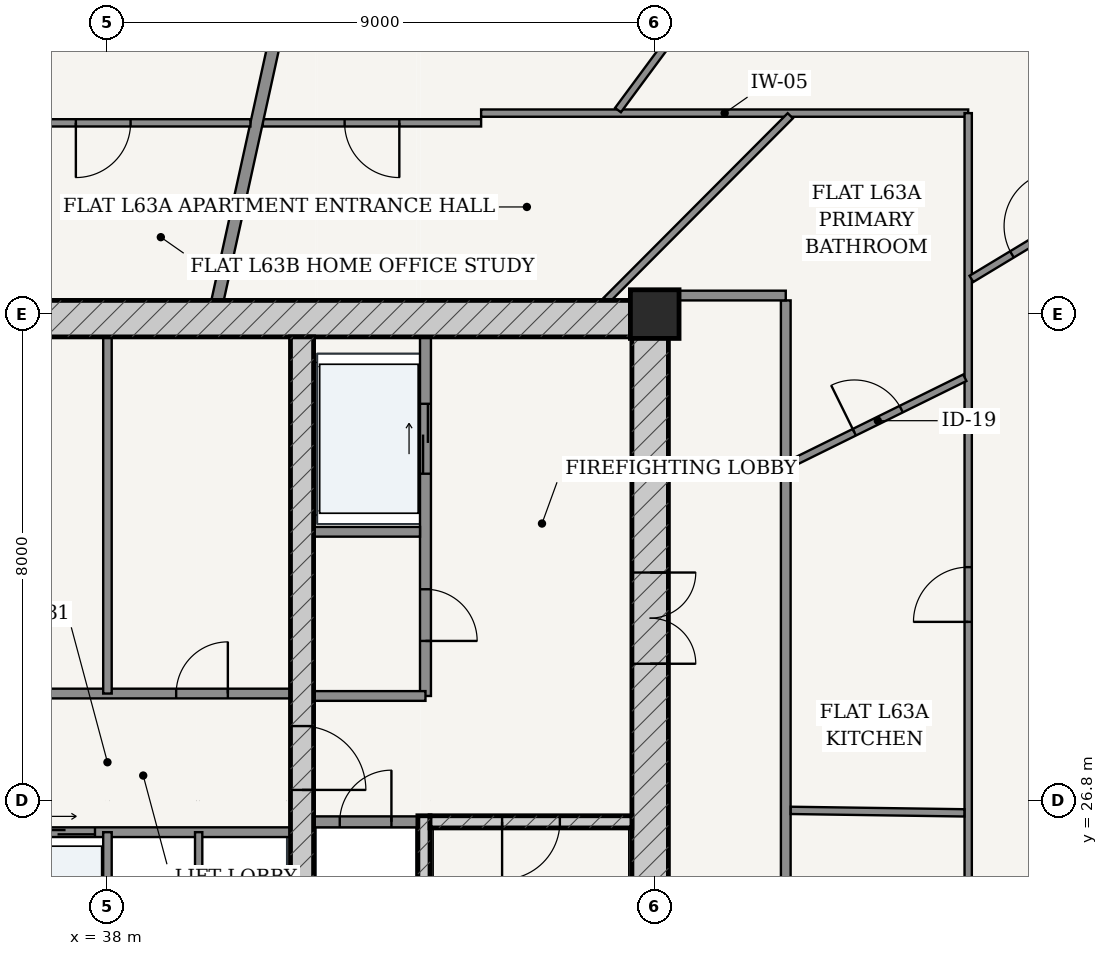
"""IFC4 building model, lengths in metres.
Left out: names, types, materials, properties, quantities, classifications, styles, units other than length and angle.
Written with IfcOpenShell. Run it as: python <this file> out.ifc"""

import sys

from ifc_helpers import new_model, si_unit, direction, frame, frame_2d, origin, origin_2d, place, context, subcontext, project, spatial, rectangle, extrude, source, transform, mapped, element, fill, save


model = new_model("IFC4")
c1 = context("Model", 3, precision=1e-05, world=origin(), true_north=direction((-0.2419218956, 0.970295726276)))
c2 = subcontext(c1, "Body", "Model", "MODEL_VIEW")
j1 = project(units=[si_unit("LENGTHUNIT", "METRE"), si_unit("PLANEANGLEUNIT", "RADIAN")], contexts=[c1])
p1 = place(None, origin())
s1 = spatial("IfcSite", under=j1, at=p1, CompositionType="ELEMENT")
p2 = place(p1, origin())
s2 = spatial("IfcBuilding", under=s1, at=p2, CompositionType="ELEMENT")
p3 = place(p2, frame((0.0, 0.0, 239.3)))
s3 = spatial("IfcBuildingStorey", under=s2, at=p3, CompositionType="ELEMENT", Elevation=239.3)
p4 = place(p3, frame((47.0, 34.8, 0.0), z_axis=(0.0, 0.0, 1.0), x_axis=(1.0, 0.0, 0.0)))
e1 = element("IfcColumn", 1, at=p4, inside=s3, PredefinedType="COLUMN", context=c2, shape_type="SweptSolid", body=[
    extrude(rectangle(XDim=0.8, YDim=0.8, at=origin_2d()), origin(), (0.0, 0.0, 1.0), 3.7),
])
p5 = place(p3, frame((28.775, 34.725, 0.0), z_axis=(0.0, 0.0, 1.0), x_axis=(1.0, 0.0, 0.0)))
e2 = element("IfcWall", 2, at=p5, inside=s3, PredefinedType="SHEAR", context=c2, shape_type="SweptSolid", body=[
    extrude(rectangle(XDim=18.45, YDim=0.6, at=frame_2d((9.225, 0.0))), origin(), (0.0, 0.0, 1.0), 3.25),
])
p6 = place(p3, frame((46.925, 19.175, 0.0), z_axis=(0.0, 0.0, 1.0), x_axis=(0.0, 1.0, 0.0)))
e3 = element("IfcWall", 3, at=p6, inside=s3, PredefinedType="SHEAR", context=c2, shape_type="SweptSolid", body=[
    extrude(rectangle(XDim=15.25, YDim=0.6, at=frame_2d((7.625, 0.0))), origin(), (0.0, 0.0, 1.0), 3.25),
])
p7 = place(p6, frame((9.875, 0.0, 0.0)))
e4 = element("IfcOpeningElement", 4, at=p7, cuts=e3, PredefinedType="OPENING", context=c2, shape_type="SweptSolid", body=[
    extrude(rectangle(XDim=1.5, YDim=2.2, at=frame_2d((0.75, 1.1))), frame((0.0, 0.31, 0.0), z_axis=(0.0, -1.0, 0.0), x_axis=(1.0, 0.0, 0.0)), (0.0, 0.0, 1.0), 0.62),
])
p8 = place(p3, frame((43.205, 19.175, 0.0), z_axis=(0.0, 0.0, 1.0), x_axis=(0.0, 1.0, 0.0)))
e5 = element("IfcWall", 5, at=p8, inside=s3, PredefinedType="SOLIDWALL", context=c2, shape_type="SweptSolid", body=[
    extrude(rectangle(XDim=7.375, YDim=0.2, at=frame_2d((3.688, 0.0))), origin(), (0.0, 0.0, 1.0), 3.25),
])
p9 = place(p3, frame((43.305, 26.45, 0.0), z_axis=(0.0, 0.0, 1.0), x_axis=(1.0, 0.0, 0.0)))
e6 = element("IfcWall", 6, at=p9, inside=s3, PredefinedType="SOLIDWALL", context=c2, shape_type="SweptSolid", body=[
    extrude(rectangle(XDim=3.32, YDim=0.2, at=frame_2d((1.66, 0.0))), origin(), (0.0, 0.0, 1.0), 3.25),
])
p10 = place(p9, frame((1.185, 0.0, 0.0)))
e7 = element("IfcOpeningElement", 7, at=p10, cuts=e6, PredefinedType="OPENING", context=c2, shape_type="SweptSolid", body=[
    extrude(rectangle(XDim=0.95, YDim=2.15, at=frame_2d((0.475, 1.075))), frame((0.0, 0.11, 0.0), z_axis=(0.0, -1.0, 0.0), x_axis=(1.0, 0.0, 0.0)), (0.0, 0.0, 1.0), 0.22),
])
p11 = place(p3, frame((41.2, 19.175, 0.0), z_axis=(0.0, 0.0, 1.0), x_axis=(0.0, 1.0, 0.0)))
e8 = element("IfcWall", 8, at=p11, inside=s3, PredefinedType="SHEAR", context=c2, shape_type="SweptSolid", body=[
    extrude(rectangle(XDim=15.25, YDim=0.38, at=frame_2d((7.625, 0.0))), origin(), (0.0, 0.0, 1.0), 3.25),
])
p12 = place(p11, frame((7.8, 0.0, 0.0)))
e9 = element("IfcOpeningElement", 9, at=p12, cuts=e8, PredefinedType="OPENING", context=c2, shape_type="SweptSolid", body=[
    extrude(rectangle(XDim=1.05, YDim=2.15, at=frame_2d((0.525, 1.075))), frame((0.0, 0.2, 0.0), z_axis=(0.0, -1.0, 0.0), x_axis=(1.0, 0.0, 0.0)), (0.0, 0.0, 1.0), 0.4),
])
p13 = place(p3, frame((41.39, 26.45, 0.0), z_axis=(0.0, 0.0, 1.0), x_axis=(1.0, 0.0, 0.0)))
e10 = element("IfcWall", 10, at=p13, inside=s3, PredefinedType="PARTITIONING", context=c2, shape_type="SweptSolid", body=[
    extrude(rectangle(XDim=1.71, YDim=0.18, at=frame_2d((0.855, 0.0))), origin(), (0.0, 0.0, 1.0), 3.25),
])
p14 = place(p13, frame((0.43, 0.0, 0.0)))
e11 = element("IfcOpeningElement", 11, at=p14, cuts=e10, PredefinedType="OPENING", context=c2, shape_type="SweptSolid", body=[
    extrude(rectangle(XDim=0.85, YDim=2.1, at=frame_2d((0.425, 1.05))), frame((0.0, 0.1, 0.0), z_axis=(0.0, -1.0, 0.0), x_axis=(1.0, 0.0, 0.0)), (0.0, 0.0, 1.0), 0.2),
])
p15 = place(p3, frame((43.23, 28.52, 0.0), z_axis=(0.0, 0.0, 1.0), x_axis=(0.0, 1.0, 0.0)))
e12 = element("IfcWall", 12, at=p15, inside=s3, PredefinedType="PARTITIONING", context=c2, shape_type="SweptSolid", body=[
    extrude(rectangle(XDim=5.905, YDim=0.18, at=frame_2d((2.953, 0.0))), origin(), (0.0, 0.0, 1.0), 3.25),
])
p16 = place(p15, frame((0.905, 0.0, 0.0)))
e13 = element("IfcOpeningElement", 13, at=p16, cuts=e12, PredefinedType="OPENING", context=c2, shape_type="SweptSolid", body=[
    extrude(rectangle(XDim=0.85, YDim=2.1, at=frame_2d((0.425, 1.05))), frame((0.0, 0.1, 0.0), z_axis=(0.0, -1.0, 0.0), x_axis=(1.0, 0.0, 0.0)), (0.0, 0.0, 1.0), 0.2),
])
p17 = place(p15, frame((3.655, 0.0, 0.0)))
e14 = element("IfcOpeningElement", 14, at=p17, cuts=e12, PredefinedType="OPENING", context=c2, shape_type="SweptSolid", body=[
    extrude(rectangle(XDim=1.15, YDim=2.2, at=frame_2d((0.575, 1.1))), frame((0.0, 0.1, 0.0), z_axis=(0.0, -1.0, 0.0), x_axis=(1.0, 0.0, 0.0)), (0.0, 0.0, 1.0), 0.2),
])
p18 = place(p3, frame((41.39, 31.22, 0.0), z_axis=(0.0, 0.0, 1.0), x_axis=(1.0, 0.0, 0.0)))
e15 = element("IfcWall", 15, at=p18, inside=s3, PredefinedType="PARTITIONING", context=c2, shape_type="SweptSolid", body=[
    extrude(rectangle(XDim=1.75, YDim=0.16, at=frame_2d((0.875, 0.0))), origin(), (0.0, 0.0, 1.0), 3.25),
])
p19 = place(p3, frame((41.39, 28.52, 0.0), z_axis=(0.0, 0.0, 1.0), x_axis=(1.0, 0.0, 0.0)))
e16 = element("IfcWall", 16, at=p19, inside=s3, PredefinedType="PARTITIONING", context=c2, shape_type="SweptSolid", body=[
    extrude(rectangle(XDim=1.84, YDim=0.16, at=frame_2d((0.92, 0.0))), origin(), (0.0, 0.0, 1.0), 3.25),
])
p20 = place(p3, frame((34.99, 28.56, 0.0), z_axis=(0.0, 0.0, 1.0), x_axis=(1.0, 0.0, 0.0)))
e17 = element("IfcWall", 17, at=p20, inside=s3, PredefinedType="PARTITIONING", context=c2, shape_type="SweptSolid", body=[
    extrude(rectangle(XDim=6.02, YDim=0.16, at=frame_2d((3.01, 0.0))), origin(), (0.0, 0.0, 1.0), 3.25),
])
p21 = place(p20, frame((1.025, 0.0, 0.0)))
e18 = element("IfcOpeningElement", 18, at=p21, cuts=e17, PredefinedType="OPENING", context=c2, shape_type="SweptSolid", body=[
    extrude(rectangle(XDim=0.86, YDim=2.1, at=frame_2d((0.43, 1.05))), frame((0.0, 0.09, 0.0), z_axis=(0.0, -1.0, 0.0), x_axis=(1.0, 0.0, 0.0)), (0.0, 0.0, 1.0), 0.18),
])
p22 = place(p20, frame((4.14, 0.0, 0.0)))
e19 = element("IfcOpeningElement", 19, at=p22, cuts=e17, PredefinedType="OPENING", context=c2, shape_type="SweptSolid", body=[
    extrude(rectangle(XDim=0.85, YDim=2.1, at=frame_2d((0.425, 1.05))), frame((0.0, 0.09, 0.0), z_axis=(0.0, -1.0, 0.0), x_axis=(1.0, 0.0, 0.0)), (0.0, 0.0, 1.0), 0.18),
])
p23 = place(p3, frame((38.0, 28.56, 0.0), z_axis=(0.0, 0.0, 1.0), x_axis=(0.0, 1.0, 0.0)))
e20 = element("IfcWall", 20, at=p23, inside=s3, PredefinedType="PARTITIONING", context=c2, shape_type="SweptSolid", body=[
    extrude(rectangle(XDim=5.865, YDim=0.14, at=frame_2d((2.933, 0.0))), origin(), (0.0, 0.0, 1.0), 3.25),
])
p24 = place(p3, frame((34.99, 26.28, 0.0), z_axis=(0.0, 0.0, 1.0), x_axis=(1.0, 0.0, 0.0)))
e21 = element("IfcWall", 21, at=p24, inside=s3, PredefinedType="PARTITIONING", context=c2, shape_type="SweptSolid", body=[
    extrude(rectangle(XDim=6.02, YDim=0.16, at=frame_2d((3.01, 0.0))), origin(), (0.0, 0.0, 1.0), 3.25),
])
p25 = place(p24, frame((0.225, 0.0, 0.0)))
e22 = element("IfcOpeningElement", 22, at=p25, cuts=e21, PredefinedType="OPENING", context=c2, shape_type="SweptSolid", body=[
    extrude(rectangle(XDim=1.1, YDim=2.2, at=frame_2d((0.55, 1.1))), frame((0.0, 0.09, 0.0), z_axis=(0.0, -1.0, 0.0), x_axis=(1.0, 0.0, 0.0)), (0.0, 0.0, 1.0), 0.18),
])
p26 = place(p24, frame((1.705, 0.0, 0.0)))
e23 = element("IfcOpeningElement", 23, at=p26, cuts=e21, PredefinedType="OPENING", context=c2, shape_type="SweptSolid", body=[
    extrude(rectangle(XDim=1.1, YDim=2.2, at=frame_2d((0.55, 1.1))), frame((0.0, 0.09, 0.0), z_axis=(0.0, -1.0, 0.0), x_axis=(1.0, 0.0, 0.0)), (0.0, 0.0, 1.0), 0.18),
])
p27 = place(p3, frame((38.0, 23.72, 0.0), z_axis=(0.0, 0.0, 1.0), x_axis=(0.0, 1.0, 0.0)))
e24 = element("IfcWall", 24, at=p27, inside=s3, PredefinedType="PARTITIONING", context=c2, shape_type="SweptSolid", body=[
    extrude(rectangle(XDim=2.56, YDim=0.14, at=frame_2d((1.28, 0.0))), origin(), (0.0, 0.0, 1.0), 3.25),
])
p28 = place(p3, frame((39.5, 23.72, 0.0), z_axis=(0.0, 0.0, 1.0), x_axis=(0.0, 1.0, 0.0)))
e25 = element("IfcWall", 25, at=p28, inside=s3, PredefinedType="PARTITIONING", context=c2, shape_type="SweptSolid", body=[
    extrude(rectangle(XDim=2.56, YDim=0.12, at=frame_2d((1.28, 0.0))), origin(), (0.0, 0.0, 1.0), 3.25),
])
p29 = place(p3, frame((49.155, 16.725, 0.0), z_axis=(0.0, 0.0, 1.0), x_axis=(0.0, 1.0, 0.0)))
e26 = element("IfcWall", 26, at=p29, inside=s3, PredefinedType="PARTITIONING", context=c2, shape_type="SweptSolid", body=[
    extrude(rectangle(XDim=18.3, YDim=0.16, at=frame_2d((9.15, 0.0))), origin(), (0.0, 0.0, 1.0), 2.775),
])
p30 = place(p29, frame((7.401, 0.0, 0.0)))
e27 = element("IfcOpeningElement", 27, at=p30, cuts=e26, PredefinedType="OPENING", context=c2, shape_type="SweptSolid", body=[
    extrude(rectangle(XDim=0.98, YDim=2.2, at=frame_2d((0.49, 1.1))), frame((0.0, 0.09, 0.0), z_axis=(0.0, -1.0, 0.0), x_axis=(1.0, 0.0, 0.0)), (0.0, 0.0, 1.0), 0.18),
])
p31 = place(p3, frame((47.225, 35.105, 0.0), z_axis=(0.0, 0.0, 1.0), x_axis=(1.0, 0.0, 0.0)))
e28 = element("IfcWall", 28, at=p31, inside=s3, PredefinedType="PARTITIONING", context=c2, shape_type="SweptSolid", body=[
    extrude(rectangle(XDim=1.93, YDim=0.16, at=frame_2d((0.965, 0.0))), origin(), (0.0, 0.0, 1.0), 3.25),
])
p32 = place(p3, frame((40.555, 37.945, 0.0), z_axis=(0.0, 0.0, 1.0), x_axis=(1.0, 0.0, 0.0)))
e29 = element("IfcWall", 29, at=p32, inside=s3, PredefinedType="PARTITIONING", context=c2, shape_type="SweptSolid", body=[
    extrude(rectangle(XDim=3.59, YDim=0.12, at=frame_2d((1.795, 0.0))), origin(), (0.0, 0.0, 1.0), 3.25),
])
p33 = place(p32, frame((1.345, 0.0, 0.0)))
e30 = element("IfcOpeningElement", 30, at=p33, cuts=e29, PredefinedType="OPENING", context=c2, shape_type="SweptSolid", body=[
    extrude(rectangle(XDim=0.9, YDim=2.15, at=frame_2d((0.45, 1.075))), frame((0.0, 0.07, 0.0), z_axis=(0.0, -1.0, 0.0), x_axis=(1.0, 0.0, 0.0)), (0.0, 0.0, 1.0), 0.14),
])
p34 = place(p3, frame((44.145, 38.105, 0.0), z_axis=(0.0, 0.0, 1.0), x_axis=(1.0, 0.0, 0.0)))
e31 = element("IfcWall", 31, at=p34, inside=s3, PredefinedType="PARTITIONING", context=c2, shape_type="SweptSolid", body=[
    extrude(rectangle(XDim=8.01, YDim=0.12, at=frame_2d((4.005, 0.0))), origin(), (0.0, 0.0, 1.0), 2.775),
])
p35 = place(p3, frame((52.155, 38.105, 0.0), z_axis=(0.0, 0.0, 1.0), x_axis=(0.0, -1.0, 0.0)))
e32 = element("IfcWall", 32, at=p35, inside=s3, PredefinedType="PARTITIONING", context=c2, shape_type="SweptSolid", body=[
    extrude(rectangle(XDim=16.501, YDim=0.12, at=frame_2d((8.251, 0.0))), origin(), (0.0, 0.0, 1.0), 2.775),
])
p36 = place(p35, frame((13.395, 0.0, 0.0)))
e33 = element("IfcOpeningElement", 33, at=p36, cuts=e32, PredefinedType="OPENING", context=c2, shape_type="SweptSolid", body=[
    extrude(rectangle(XDim=0.9, YDim=2.15, at=frame_2d((0.45, 1.075))), frame((0.0, 0.07, 0.0), z_axis=(0.0, -1.0, 0.0), x_axis=(1.0, 0.0, 0.0)), (0.0, 0.0, 1.0), 0.14),
])
p37 = place(p35, frame((7.467, 0.0, 0.0)))
e34 = element("IfcOpeningElement", 34, at=p37, cuts=e32, PredefinedType="OPENING", context=c2, shape_type="SweptSolid", body=[
    extrude(rectangle(XDim=0.9, YDim=2.15, at=frame_2d((0.45, 1.075))), frame((0.0, 0.07, 0.0), z_axis=(0.0, -1.0, 0.0), x_axis=(1.0, 0.0, 0.0)), (0.0, 0.0, 1.0), 0.14),
])
p38 = place(p3, frame((52.208, 35.379, 0.0), z_axis=(0.0, 0.0, 1.0), x_axis=(0.856039372964, 0.516910622774, 0.0)))
e35 = element("IfcWall", 35, at=p38, inside=s3, PredefinedType="PARTITIONING", context=c2, shape_type="SweptSolid", body=[
    extrude(rectangle(XDim=4.471, YDim=0.12, at=frame_2d((2.236, 0.0))), origin(), (0.0, 0.0, 1.0), 2.6),
])
p39 = place(p38, frame((0.779, 0.0, 0.0)))
e36 = element("IfcOpeningElement", 36, at=p39, cuts=e35, PredefinedType="OPENING", context=c2, shape_type="SweptSolid", body=[
    extrude(rectangle(XDim=0.9, YDim=2.15, at=frame_2d((0.45, 1.075))), frame((0.0, 0.07, 0.0), z_axis=(0.0, -1.0, 0.0), x_axis=(1.0, 0.0, 0.0)), (0.0, 0.0, 1.0), 0.14),
])
p40 = place(p3, frame((46.396, 38.155, 0.0), z_axis=(0.0, 0.0, 1.0), x_axis=(0.594526205526, 0.804076234535, 0.0)))
e37 = element("IfcWall", 37, at=p40, inside=s3, PredefinedType="PARTITIONING", context=c2, shape_type="SweptSolid", body=[
    extrude(rectangle(XDim=6.146, YDim=0.12, at=frame_2d((3.073, 0.0))), origin(), (0.0, 0.0, 1.0), 2.6),
])
p41 = place(p40, frame((1.615, 0.0, 0.0)))
e38 = element("IfcOpeningElement", 38, at=p41, cuts=e37, PredefinedType="OPENING", context=c2, shape_type="SweptSolid", body=[
    extrude(rectangle(XDim=0.9, YDim=2.15, at=frame_2d((0.45, 1.075))), frame((0.0, 0.07, 0.0), z_axis=(0.0, -1.0, 0.0), x_axis=(1.0, 0.0, 0.0)), (0.0, 0.0, 1.0), 0.14),
])
p42 = place(p3, frame((49.237, 26.639, 0.0), z_axis=(0.0, 0.0, 1.0), x_axis=(0.999896890624, -0.014359948506, 0.0)))
e39 = element("IfcWall", 39, at=p42, inside=s3, PredefinedType="PARTITIONING", context=c2, shape_type="SweptSolid", body=[
    extrude(rectangle(XDim=2.856, YDim=0.12, at=frame_2d((1.428, 0.0))), origin(), (0.0, 0.0, 1.0), 2.969),
])
p43 = place(p3, frame((49.237, 32.341, 0.0), z_axis=(0.0, 0.0, 1.0), x_axis=(0.896876689717, 0.442280684004, 0.0)))
e40 = element("IfcWall", 40, at=p43, inside=s3, PredefinedType="PARTITIONING", context=c2, shape_type="SweptSolid", body=[
    extrude(rectangle(XDim=3.192, YDim=0.12, at=frame_2d((1.596, 0.0))), origin(), (0.0, 0.0, 1.0), 2.969),
])
p44 = place(p43, frame((1.166, 0.0, 0.0)))
e41 = element("IfcOpeningElement", 41, at=p44, cuts=e40, PredefinedType="OPENING", context=c2, shape_type="SweptSolid", body=[
    extrude(rectangle(XDim=0.86, YDim=2.15, at=frame_2d((0.43, 1.075))), frame((0.0, 0.07, 0.0), z_axis=(0.0, -1.0, 0.0), x_axis=(1.0, 0.0, 0.0)), (0.0, 0.0, 1.0), 0.14),
])
p45 = place(p3, frame((46.203, 35.026, 0.0), z_axis=(0.0, 0.0, 1.0), x_axis=(0.706080585752, 0.708131489502, 0.0)))
e42 = element("IfcWall", 42, at=p45, inside=s3, PredefinedType="PARTITIONING", context=c2, shape_type="SweptSolid", body=[
    extrude(rectangle(XDim=4.285, YDim=0.12, at=frame_2d((2.143, 0.0))), origin(), (0.0, 0.0, 1.0), 2.775),
])
p46 = place(p3, frame((39.811, 35.027, 0.0), z_axis=(0.0, 0.0, 1.0), x_axis=(0.214966857327, 0.976621344356, 0.0)))
e43 = element("IfcWall", 43, at=p46, inside=s3, PredefinedType="PARTITIONING", context=c2, shape_type="SweptSolid", body=[
    extrude(rectangle(XDim=11.258, YDim=0.2, at=frame_2d((5.629, 0.0))), origin(), (0.0, 0.0, 1.0), 2.34),
])
p47 = place(p3, frame((31.855, 37.945, 0.0), z_axis=(0.0, 0.0, 1.0), x_axis=(1.0, 0.0, 0.0)))
e44 = element("IfcWall", 44, at=p47, inside=s3, PredefinedType="PARTITIONING", context=c2, shape_type="SweptSolid", body=[
    extrude(rectangle(XDim=8.496, YDim=0.12, at=frame_2d((4.248, 0.0))), origin(), (0.0, 0.0, 1.0), 2.775),
])
p48 = place(p47, frame((5.625, 0.0, 0.0)))
e45 = element("IfcOpeningElement", 45, at=p48, cuts=e44, PredefinedType="OPENING", context=c2, shape_type="SweptSolid", body=[
    extrude(rectangle(XDim=0.9, YDim=2.15, at=frame_2d((0.45, 1.075))), frame((0.0, 0.07, 0.0), z_axis=(0.0, -1.0, 0.0), x_axis=(1.0, 0.0, 0.0)), (0.0, 0.0, 1.0), 0.14),
])
m1 = source(origin(), c2, "Body", "SweptSolid", [
    extrude(rectangle(XDim=1.5, YDim=2.2, at=frame_2d((0.75, 1.1))), frame((0.0, 0.025, 0.0), z_axis=(0.0, -1.0, 0.0), x_axis=(1.0, 0.0, 0.0)), (0.0, 0.0, 1.0), 0.05),
])
p49 = place(p7, frame((1.5, 0.0, 0.0), z_axis=(0.0, 0.0, 1.0), x_axis=(-1.0, 0.0, 0.0)))
e46 = element("IfcDoor", 46, at=p49, inside=s3, OperationType="DOUBLE_DOOR_SINGLE_SWING", PredefinedType="DOOR", context=c2, shape_type="MappedRepresentation", body=[
    mapped(m1, transform((0.0, 0.0, 0.0), scale=1.0)),
])
fill(e4, e46)
m2 = source(origin(), c2, "Body", "SweptSolid", [
    extrude(rectangle(XDim=1.05, YDim=2.15, at=frame_2d((0.525, 1.075))), frame((0.0, 0.025, 0.0), z_axis=(0.0, -1.0, 0.0), x_axis=(1.0, 0.0, 0.0)), (0.0, 0.0, 1.0), 0.05),
])
p50 = place(p12, frame((1.05, 0.0, 0.0), z_axis=(0.0, 0.0, 1.0), x_axis=(-1.0, 0.0, 0.0)))
e47 = element("IfcDoor", 47, at=p50, inside=s3, OperationType="SINGLE_SWING_RIGHT", PredefinedType="DOOR", context=c2, shape_type="MappedRepresentation", body=[
    mapped(m2, transform((0.0, 0.0, 0.0), scale=1.0)),
])
fill(e9, e47)
m3 = source(origin(), c2, "Body", "SweptSolid", [
    extrude(rectangle(XDim=0.95, YDim=2.15, at=frame_2d((0.475, 1.075))), frame((0.0, 0.025, 0.0), z_axis=(0.0, -1.0, 0.0), x_axis=(1.0, 0.0, 0.0)), (0.0, 0.0, 1.0), 0.05),
])
p51 = place(p10, frame((0.95, 0.0, 0.0), z_axis=(0.0, 0.0, 1.0), x_axis=(-1.0, 0.0, 0.0)))
e48 = element("IfcDoor", 48, at=p51, inside=s3, OperationType="SINGLE_SWING_RIGHT", PredefinedType="DOOR", context=c2, shape_type="MappedRepresentation", body=[
    mapped(m3, transform((0.0, 0.0, 0.0), scale=1.0)),
])
fill(e7, e48)
m4 = source(origin(), c2, "Body", "SweptSolid", [
    extrude(rectangle(XDim=0.85, YDim=2.1, at=frame_2d((0.425, 1.05))), frame((0.0, 0.025, 0.0), z_axis=(0.0, -1.0, 0.0), x_axis=(1.0, 0.0, 0.0)), (0.0, 0.0, 1.0), 0.05),
])
p52 = place(p14, origin())
e49 = element("IfcDoor", 49, at=p52, inside=s3, OperationType="SINGLE_SWING_RIGHT", PredefinedType="DOOR", context=c2, shape_type="MappedRepresentation", body=[
    mapped(m4, transform((0.0, 0.0, 0.0), scale=1.0)),
])
fill(e11, e49)
p53 = place(p16, frame((0.85, 0.0, 0.0), z_axis=(0.0, 0.0, 1.0), x_axis=(-1.0, 0.0, 0.0)))
e50 = element("IfcDoor", 50, at=p53, inside=s3, OperationType="SINGLE_SWING_RIGHT", PredefinedType="DOOR", context=c2, shape_type="MappedRepresentation", body=[
    mapped(m4, transform((0.0, 0.0, 0.0), scale=1.0)),
])
fill(e13, e50)
p54 = place(p22, origin())
e51 = element("IfcDoor", 51, at=p54, inside=s3, OperationType="SINGLE_SWING_RIGHT", PredefinedType="DOOR", context=c2, shape_type="MappedRepresentation", body=[
    mapped(m4, transform((0.0, 0.0, 0.0), scale=1.0)),
])
fill(e19, e51)
m5 = source(origin(), c2, "Body", "SweptSolid", [
    extrude(rectangle(XDim=1.15, YDim=2.2, at=frame_2d((0.575, 1.1))), frame((0.0, 0.025, 0.0), z_axis=(0.0, -1.0, 0.0), x_axis=(1.0, 0.0, 0.0)), (0.0, 0.0, 1.0), 0.05),
])
p55 = place(p17, origin())
e52 = element("IfcDoor", 52, at=p55, inside=s3, OperationType="DOUBLE_DOOR_SLIDING", PredefinedType="DOOR", context=c2, shape_type="MappedRepresentation", body=[
    mapped(m5, transform((0.0, 0.0, 0.0), scale=1.0)),
])
fill(e14, e52)
m6 = source(origin(), c2, "Body", "SweptSolid", [
    extrude(rectangle(XDim=1.1, YDim=2.2, at=frame_2d((0.55, 1.1))), frame((0.0, 0.025, 0.0), z_axis=(0.0, -1.0, 0.0), x_axis=(1.0, 0.0, 0.0)), (0.0, 0.0, 1.0), 0.05),
])
p56 = place(p26, origin())
e53 = element("IfcDoor", 53, at=p56, inside=s3, OperationType="DOUBLE_DOOR_SLIDING", PredefinedType="DOOR", context=c2, shape_type="MappedRepresentation", body=[
    mapped(m6, transform((0.0, 0.0, 0.0), scale=1.0)),
])
fill(e23, e53)
m7 = source(origin(), c2, "Body", "SweptSolid", [
    extrude(rectangle(XDim=0.9, YDim=2.15, at=frame_2d((0.45, 1.075))), frame((0.0, 0.025, 0.0), z_axis=(0.0, -1.0, 0.0), x_axis=(1.0, 0.0, 0.0)), (0.0, 0.0, 1.0), 0.05),
])
p57 = place(p37, frame((0.9, 0.0, 0.0), z_axis=(0.0, 0.0, 1.0), x_axis=(-1.0, 0.0, 0.0)))
e54 = element("IfcDoor", 54, at=p57, inside=s3, OperationType="SINGLE_SWING_LEFT", PredefinedType="DOOR", context=c2, shape_type="MappedRepresentation", body=[
    mapped(m7, transform((0.0, 0.0, 0.0), scale=1.0)),
])
fill(e34, e54)
p58 = place(p39, origin())
e55 = element("IfcDoor", 55, at=p58, inside=s3, OperationType="SINGLE_SWING_RIGHT", PredefinedType="DOOR", context=c2, shape_type="MappedRepresentation", body=[
    mapped(m7, transform((0.0, 0.0, 0.0), scale=1.0)),
])
fill(e36, e55)
m8 = source(origin(), c2, "Body", "SweptSolid", [
    extrude(rectangle(XDim=0.86, YDim=2.15, at=frame_2d((0.43, 1.075))), frame((0.0, 0.025, 0.0), z_axis=(0.0, -1.0, 0.0), x_axis=(1.0, 0.0, 0.0)), (0.0, 0.0, 1.0), 0.05),
])
p59 = place(p44, origin())
e56 = element("IfcDoor", 56, at=p59, inside=s3, OperationType="SINGLE_SWING_LEFT", PredefinedType="DOOR", context=c2, shape_type="MappedRepresentation", body=[
    mapped(m8, transform((0.0, 0.0, 0.0), scale=1.0)),
])
fill(e41, e56)
p60 = place(p33, frame((0.9, 0.0, 0.0), z_axis=(0.0, 0.0, 1.0), x_axis=(-1.0, 0.0, 0.0)))
e57 = element("IfcDoor", 57, at=p60, inside=s3, OperationType="SINGLE_SWING_LEFT", PredefinedType="DOOR", context=c2, shape_type="MappedRepresentation", body=[
    mapped(m7, transform((0.0, 0.0, 0.0), scale=1.0)),
])
fill(e30, e57)
p61 = place(p48, frame((0.9, 0.0, 0.0), z_axis=(0.0, 0.0, 1.0), x_axis=(-1.0, 0.0, 0.0)))
e58 = element("IfcDoor", 58, at=p61, inside=s3, OperationType="SINGLE_SWING_RIGHT", PredefinedType="DOOR", context=c2, shape_type="MappedRepresentation", body=[
    mapped(m7, transform((0.0, 0.0, 0.0), scale=1.0)),
])
fill(e45, e58)
save(model, sys.argv[1])
